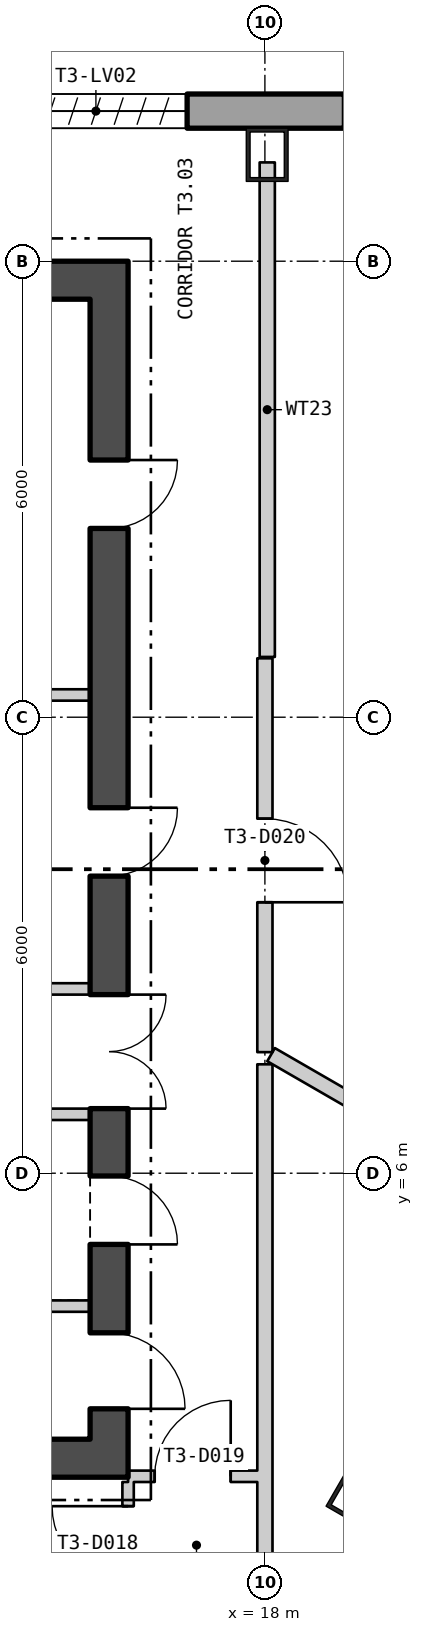
"""IFC4 building model, lengths in metres.
Left out: names, types, materials, properties, quantities, classifications, styles, units other than length and angle.
Written with IfcOpenShell. Run it as: python <this file> out.ifc"""

import sys

from ifc_helpers import new_model, si_unit, direction, frame, frame_2d, origin, origin_2d, place, context, subcontext, project, spatial, polyline, rectangle, hollow_rectangle, outline, extrude, element, fill, save


model = new_model("IFC4")
c1 = context("Model", 3, precision=1e-05, world=origin(), true_north=direction((0.0, 1.0)))
c2 = subcontext(c1, "Body", "Model", "MODEL_VIEW")
j1 = project(units=[si_unit("LENGTHUNIT", "METRE"), si_unit("PLANEANGLEUNIT", "RADIAN")], contexts=[c1])
p1 = place(None, origin())
s1 = spatial("IfcSite", under=j1, at=p1, CompositionType="ELEMENT")
p2 = place(p1, origin())
s2 = spatial("IfcBuilding", under=s1, at=p2, CompositionType="ELEMENT")
p3 = place(p2, frame((0.0, 0.0, 186.6)))
s3 = spatial("IfcBuildingStorey", under=s2, at=p3, CompositionType="ELEMENT", Elevation=186.6)
for number, where, z_axis, x_axis in (
    (1, (18.03, 19.4, 0.0), (0.0, 0.0, 1.0), (-1.0, 0.0, 0.0)),
    (2, (19.245, 1.682, 0.0), (0.0, 0.0, 1.0), (0.5, 0.866, 0.0)),
):
    element("IfcColumn", number, at=place(p3, frame(where, z_axis=z_axis, x_axis=x_axis)), inside=s3, PredefinedType="COLUMN", context=c2, shape_type="SweptSolid", body=[
        extrude(hollow_rectangle(XDim=0.55, YDim=0.7, WallThickness=0.05, at=origin_2d()), origin(), (0.0, 0.0, 1.0), 6.0),
    ])
p4 = place(p3, frame((22.87, 19.975, -0.4), z_axis=(0.0, 0.0, 1.0), x_axis=(-1.0, 0.0, 0.0)))
e3 = element("IfcWall", 3, at=p4, inside=s3, PredefinedType="SOLIDWALL", context=c2, shape_type="SweptSolid", body=[
    extrude(outline(polyline([(-0.13, -0.225), (45.87, -0.225), (45.61, 0.225), (0.13, 0.225), (-0.13, -0.225)])), origin(), (0.0, 0.0, 1.0), 6.0),
])
p5 = place(p4, frame((1.424, 0.0, 1.6)))
e4 = element("IfcOpeningElement", 4, at=p5, cuts=e3, PredefinedType="OPENING", context=c2, shape_type="SweptSolid", body=[
    extrude(rectangle(XDim=2.4, YDim=3.6, at=frame_2d((1.2, 1.8))), frame((0.0, 0.235, 0.0), z_axis=(0.0, -1.0, 0.0), x_axis=(1.0, 0.0, 0.0)), (0.0, 0.0, 1.0), 0.47),
])
p6 = place(p4, frame((5.893, 0.0, 1.6)))
e5 = element("IfcOpeningElement", 5, at=p6, cuts=e3, PredefinedType="OPENING", context=c2, shape_type="SweptSolid", body=[
    extrude(rectangle(XDim=2.4, YDim=3.6, at=frame_2d((1.2, 1.8))), frame((0.0, 0.235, 0.0), z_axis=(0.0, -1.0, 0.0), x_axis=(1.0, 0.0, 0.0)), (0.0, 0.0, 1.0), 0.47),
])
p7 = place(p4, frame((10.401, 0.0, 1.6)))
e6 = element("IfcOpeningElement", 6, at=p7, cuts=e3, PredefinedType="OPENING", context=c2, shape_type="SweptSolid", body=[
    extrude(rectangle(XDim=2.4, YDim=3.6, at=frame_2d((1.2, 1.8))), frame((0.0, 0.235, 0.0), z_axis=(0.0, -1.0, 0.0), x_axis=(1.0, 0.0, 0.0)), (0.0, 0.0, 1.0), 0.47),
])
p8 = place(p4, frame((14.909, 0.0, 1.6)))
e7 = element("IfcOpeningElement", 7, at=p8, cuts=e3, PredefinedType="OPENING", context=c2, shape_type="SweptSolid", body=[
    extrude(rectangle(XDim=2.4, YDim=3.6, at=frame_2d((1.2, 1.8))), frame((0.0, 0.235, 0.0), z_axis=(0.0, -1.0, 0.0), x_axis=(1.0, 0.0, 0.0)), (0.0, 0.0, 1.0), 0.47),
])
p9 = place(p4, frame((19.416, 0.0, 1.6)))
e8 = element("IfcOpeningElement", 8, at=p9, cuts=e3, PredefinedType="OPENING", context=c2, shape_type="SweptSolid", body=[
    extrude(rectangle(XDim=2.4, YDim=3.6, at=frame_2d((1.2, 1.8))), frame((0.0, 0.235, 0.0), z_axis=(0.0, -1.0, 0.0), x_axis=(1.0, 0.0, 0.0)), (0.0, 0.0, 1.0), 0.47),
])
p10 = place(p4, frame((23.924, 0.0, 1.6)))
e9 = element("IfcOpeningElement", 9, at=p10, cuts=e3, PredefinedType="OPENING", context=c2, shape_type="SweptSolid", body=[
    extrude(rectangle(XDim=2.4, YDim=3.6, at=frame_2d((1.2, 1.8))), frame((0.0, 0.235, 0.0), z_axis=(0.0, -1.0, 0.0), x_axis=(1.0, 0.0, 0.0)), (0.0, 0.0, 1.0), 0.47),
])
p11 = place(p4, frame((28.431, 0.0, 1.6)))
e10 = element("IfcOpeningElement", 10, at=p11, cuts=e3, PredefinedType="OPENING", context=c2, shape_type="SweptSolid", body=[
    extrude(rectangle(XDim=2.4, YDim=3.6, at=frame_2d((1.2, 1.8))), frame((0.0, 0.235, 0.0), z_axis=(0.0, -1.0, 0.0), x_axis=(1.0, 0.0, 0.0)), (0.0, 0.0, 1.0), 0.47),
])
p12 = place(p4, frame((32.939, 0.0, 1.6)))
e11 = element("IfcOpeningElement", 11, at=p12, cuts=e3, PredefinedType="OPENING", context=c2, shape_type="SweptSolid", body=[
    extrude(rectangle(XDim=2.4, YDim=3.6, at=frame_2d((1.2, 1.8))), frame((0.0, 0.235, 0.0), z_axis=(0.0, -1.0, 0.0), x_axis=(1.0, 0.0, 0.0)), (0.0, 0.0, 1.0), 0.47),
])
p13 = place(p4, frame((37.447, 0.0, 1.6)))
e12 = element("IfcOpeningElement", 12, at=p13, cuts=e3, PredefinedType="OPENING", context=c2, shape_type="SweptSolid", body=[
    extrude(rectangle(XDim=2.4, YDim=3.6, at=frame_2d((1.2, 1.8))), frame((0.0, 0.235, 0.0), z_axis=(0.0, -1.0, 0.0), x_axis=(1.0, 0.0, 0.0)), (0.0, 0.0, 1.0), 0.47),
])
p14 = place(p4, frame((41.916, 0.0, 1.6)))
e13 = element("IfcOpeningElement", 13, at=p14, cuts=e3, PredefinedType="OPENING", context=c2, shape_type="SweptSolid", body=[
    extrude(rectangle(XDim=2.4, YDim=3.6, at=frame_2d((1.2, 1.8))), frame((0.0, 0.235, 0.0), z_axis=(0.0, -1.0, 0.0), x_axis=(1.0, 0.0, 0.0)), (0.0, 0.0, 1.0), 0.47),
])
p15 = place(p3, frame((3.8, -26.219, -0.18), z_axis=(0.0, 0.0, 1.0), x_axis=(0.500000711659, 0.866024992908, 0.0)))
e14 = element("IfcWall", 14, at=p15, inside=s3, PredefinedType="SOLIDWALL", context=c2, shape_type="SweptSolid", body=[
    extrude(outline(polyline([(-0.13, -0.225), (45.87, -0.225), (45.61, 0.225), (0.13, 0.225), (-0.13, -0.225)])), origin(), (0.0, 0.0, 1.0), 6.0),
])
p16 = place(p15, frame((1.424, 0.0, 1.38)))
e15 = element("IfcOpeningElement", 15, at=p16, cuts=e14, PredefinedType="OPENING", context=c2, shape_type="SweptSolid", body=[
    extrude(rectangle(XDim=2.4, YDim=3.6, at=frame_2d((1.2, 1.8))), frame((0.0, 0.235, 0.0), z_axis=(0.0, -1.0, 0.0), x_axis=(1.0, 0.0, 0.0)), (0.0, 0.0, 1.0), 0.47),
])
p17 = place(p15, frame((5.893, 0.0, 1.38)))
e16 = element("IfcOpeningElement", 16, at=p17, cuts=e14, PredefinedType="OPENING", context=c2, shape_type="SweptSolid", body=[
    extrude(rectangle(XDim=2.4, YDim=3.6, at=frame_2d((1.2, 1.8))), frame((0.0, 0.235, 0.0), z_axis=(0.0, -1.0, 0.0), x_axis=(1.0, 0.0, 0.0)), (0.0, 0.0, 1.0), 0.47),
])
p18 = place(p15, frame((10.401, 0.0, 1.38)))
e17 = element("IfcOpeningElement", 17, at=p18, cuts=e14, PredefinedType="OPENING", context=c2, shape_type="SweptSolid", body=[
    extrude(rectangle(XDim=2.4, YDim=3.6, at=frame_2d((1.2, 1.8))), frame((0.0, 0.235, 0.0), z_axis=(0.0, -1.0, 0.0), x_axis=(1.0, 0.0, 0.0)), (0.0, 0.0, 1.0), 0.47),
])
p19 = place(p15, frame((14.909, 0.0, 1.38)))
e18 = element("IfcOpeningElement", 18, at=p19, cuts=e14, PredefinedType="OPENING", context=c2, shape_type="SweptSolid", body=[
    extrude(rectangle(XDim=2.4, YDim=3.6, at=frame_2d((1.2, 1.8))), frame((0.0, 0.235, 0.0), z_axis=(0.0, -1.0, 0.0), x_axis=(1.0, 0.0, 0.0)), (0.0, 0.0, 1.0), 0.47),
])
p20 = place(p15, frame((19.416, 0.0, 1.38)))
e19 = element("IfcOpeningElement", 19, at=p20, cuts=e14, PredefinedType="OPENING", context=c2, shape_type="SweptSolid", body=[
    extrude(rectangle(XDim=2.4, YDim=3.6, at=frame_2d((1.2, 1.8))), frame((0.0, 0.235, 0.0), z_axis=(0.0, -1.0, 0.0), x_axis=(1.0, 0.0, 0.0)), (0.0, 0.0, 1.0), 0.47),
])
p21 = place(p15, frame((23.924, 0.0, 1.38)))
e20 = element("IfcOpeningElement", 20, at=p21, cuts=e14, PredefinedType="OPENING", context=c2, shape_type="SweptSolid", body=[
    extrude(rectangle(XDim=2.4, YDim=3.6, at=frame_2d((1.2, 1.8))), frame((0.0, 0.235, 0.0), z_axis=(0.0, -1.0, 0.0), x_axis=(1.0, 0.0, 0.0)), (0.0, 0.0, 1.0), 0.47),
])
p22 = place(p15, frame((28.431, 0.0, 1.38)))
e21 = element("IfcOpeningElement", 21, at=p22, cuts=e14, PredefinedType="OPENING", context=c2, shape_type="SweptSolid", body=[
    extrude(rectangle(XDim=2.4, YDim=3.6, at=frame_2d((1.2, 1.8))), frame((0.0, 0.235, 0.0), z_axis=(0.0, -1.0, 0.0), x_axis=(1.0, 0.0, 0.0)), (0.0, 0.0, 1.0), 0.47),
])
p23 = place(p15, frame((32.939, 0.0, 1.38)))
e22 = element("IfcOpeningElement", 22, at=p23, cuts=e14, PredefinedType="OPENING", context=c2, shape_type="SweptSolid", body=[
    extrude(rectangle(XDim=2.4, YDim=3.6, at=frame_2d((1.2, 1.8))), frame((0.0, 0.235, 0.0), z_axis=(0.0, -1.0, 0.0), x_axis=(1.0, 0.0, 0.0)), (0.0, 0.0, 1.0), 0.47),
])
p24 = place(p15, frame((37.447, 0.0, 1.38)))
e23 = element("IfcOpeningElement", 23, at=p24, cuts=e14, PredefinedType="OPENING", context=c2, shape_type="SweptSolid", body=[
    extrude(rectangle(XDim=2.4, YDim=3.6, at=frame_2d((1.2, 1.8))), frame((0.0, 0.235, 0.0), z_axis=(0.0, -1.0, 0.0), x_axis=(1.0, 0.0, 0.0)), (0.0, 0.0, 1.0), 0.47),
])
p25 = place(p15, frame((41.916, 0.0, 1.38)))
e24 = element("IfcOpeningElement", 24, at=p25, cuts=e14, PredefinedType="OPENING", context=c2, shape_type="SweptSolid", body=[
    extrude(rectangle(XDim=2.4, YDim=3.6, at=frame_2d((1.2, 1.8))), frame((0.0, 0.235, 0.0), z_axis=(0.0, -1.0, 0.0), x_axis=(1.0, 0.0, 0.0)), (0.0, 0.0, 1.0), 0.47),
])
p26 = place(p3, frame((-16.2, 2.25, 0.0), z_axis=(0.0, 0.0, 1.0), x_axis=(1.0, 0.0, 0.0)))
e25 = element("IfcWall", 25, at=p26, inside=s3, PredefinedType="SHEAR", context=c2, shape_type="SweptSolid", body=[
    extrude(rectangle(XDim=32.4, YDim=0.5, at=frame_2d((16.2, 0.0))), origin(), (0.0, 0.0, 1.0), 5.8),
])
p27 = place(p26, frame((10.7, 0.0, 0.0)))
e26 = element("IfcOpeningElement", 26, at=p27, cuts=e25, PredefinedType="OPENING", context=c2, shape_type="SweptSolid", body=[
    extrude(rectangle(XDim=1.8, YDim=2.4, at=frame_2d((0.9, 1.2))), frame((0.0, 0.26, 0.0), z_axis=(0.0, -1.0, 0.0), x_axis=(1.0, 0.0, 0.0)), (0.0, 0.0, 1.0), 0.52),
])
p28 = place(p26, frame((20.7, 0.0, 0.0)))
e27 = element("IfcOpeningElement", 27, at=p28, cuts=e25, PredefinedType="OPENING", context=c2, shape_type="SweptSolid", body=[
    extrude(rectangle(XDim=1.8, YDim=2.4, at=frame_2d((0.9, 1.2))), frame((0.0, 0.26, 0.0), z_axis=(0.0, -1.0, 0.0), x_axis=(1.0, 0.0, 0.0)), (0.0, 0.0, 1.0), 0.52),
])
p29 = place(p3, frame((-16.2, 17.75, 0.0), z_axis=(0.0, 0.0, 1.0), x_axis=(1.0, 0.0, 0.0)))
e28 = element("IfcWall", 28, at=p29, inside=s3, PredefinedType="SHEAR", context=c2, shape_type="SweptSolid", body=[
    extrude(rectangle(XDim=32.4, YDim=0.5, at=frame_2d((16.2, 0.0))), origin(), (0.0, 0.0, 1.0), 5.8),
])
p30 = place(p3, frame((15.95, 2.5, 0.0), z_axis=(0.0, 0.0, 1.0), x_axis=(0.0, 1.0, 0.0)))
e29 = element("IfcWall", 29, at=p30, inside=s3, PredefinedType="SHEAR", context=c2, shape_type="SweptSolid", body=[
    extrude(rectangle(XDim=15.0, YDim=0.5, at=frame_2d((7.5, 0.0))), origin(), (0.0, 0.0, 1.0), 5.8),
])
p31 = place(p30, frame((4.35, 0.0, 0.0)))
e30 = element("IfcOpeningElement", 30, at=p31, cuts=e29, PredefinedType="OPENING", context=c2, shape_type="SweptSolid", body=[
    extrude(rectangle(XDim=1.5, YDim=2.1, at=frame_2d((0.75, 1.05))), frame((0.0, 0.26, 0.0), z_axis=(0.0, -1.0, 0.0), x_axis=(1.0, 0.0, 0.0)), (0.0, 0.0, 1.0), 0.52),
])
p32 = place(p30, frame((0.4, 0.0, 0.0)))
e31 = element("IfcOpeningElement", 31, at=p32, cuts=e29, PredefinedType="OPENING", context=c2, shape_type="SweptSolid", body=[
    extrude(rectangle(XDim=1.0, YDim=2.1, at=frame_2d((0.5, 1.05))), frame((0.0, 0.26, 0.0), z_axis=(0.0, -1.0, 0.0), x_axis=(1.0, 0.0, 0.0)), (0.0, 0.0, 1.0), 0.52),
])
p33 = place(p30, frame((2.563, 0.0, 0.0)))
e32 = element("IfcOpeningElement", 32, at=p33, cuts=e29, PredefinedType="OPENING", context=c2, shape_type="SweptSolid", body=[
    extrude(rectangle(XDim=0.9, YDim=2.1, at=frame_2d((0.45, 1.05))), frame((0.0, 0.26, 0.0), z_axis=(0.0, -1.0, 0.0), x_axis=(1.0, 0.0, 0.0)), (0.0, 0.0, 1.0), 0.52),
])
p34 = place(p30, frame((7.409, 0.0, 0.0)))
e33 = element("IfcOpeningElement", 33, at=p34, cuts=e29, PredefinedType="OPENING", context=c2, shape_type="SweptSolid", body=[
    extrude(rectangle(XDim=0.9, YDim=2.1, at=frame_2d((0.45, 1.05))), frame((0.0, 0.26, 0.0), z_axis=(0.0, -1.0, 0.0), x_axis=(1.0, 0.0, 0.0)), (0.0, 0.0, 1.0), 0.52),
])
p35 = place(p30, frame((11.984, 0.0, 0.0)))
e34 = element("IfcOpeningElement", 34, at=p35, cuts=e29, PredefinedType="OPENING", context=c2, shape_type="SweptSolid", body=[
    extrude(rectangle(XDim=0.9, YDim=2.1, at=frame_2d((0.45, 1.05))), frame((0.0, 0.26, 0.0), z_axis=(0.0, -1.0, 0.0), x_axis=(1.0, 0.0, 0.0)), (0.0, 0.0, 1.0), 0.52),
])
for number, where, z_axis, x_axis in (
    (35, (14.5, 6.775, 0.0), (0.0, 0.0, 1.0), (1.0, 0.0, 0.0)),
    (36, (14.5, 8.425, 0.0), (0.0, 0.0, 1.0), (1.0, 0.0, 0.0)),
    (37, (14.5, 4.251, 0.0), (0.0, 0.0, 1.0), (1.0, 0.0, 0.0)),
    (38, (14.5, 12.293, 0.0), (0.0, 0.0, 1.0), (1.0, 0.0, 0.0)),
):
    element("IfcWall", number, at=place(p3, frame(where, z_axis=z_axis, x_axis=x_axis)), inside=s3, PredefinedType="PARTITIONING", context=c2, shape_type="SweptSolid", body=[
        extrude(rectangle(XDim=1.2, YDim=0.15, at=frame_2d((0.6, 0.0))), origin(), (0.0, 0.0, 1.0), 5.8),
    ])
p36 = place(p3, frame((16.2, 0.3, 0.0), z_axis=(0.0, 0.0, 1.0), x_axis=(0.0, 1.0, 0.0)))
e39 = element("IfcWall", 39, at=p36, inside=s3, PredefinedType="PARTITIONING", context=c2, shape_type="SweptSolid", body=[
    extrude(rectangle(XDim=1.637, YDim=0.15, at=frame_2d((0.819, 0.0))), origin(), (0.0, 0.0, 1.0), 5.8),
])
p37 = place(p36, frame((0.319, 0.0, 0.0)))
e40 = element("IfcOpeningElement", 40, at=p37, cuts=e39, PredefinedType="OPENING", context=c2, shape_type="SweptSolid", body=[
    extrude(rectangle(XDim=1.0, YDim=2.1, at=frame_2d((0.5, 1.05))), frame((0.0, 0.085, 0.0), z_axis=(0.0, -1.0, 0.0), x_axis=(1.0, 0.0, 0.0)), (0.0, 0.0, 1.0), 0.17),
])
p38 = place(p3, frame((16.2, 2.012, 0.0), z_axis=(0.0, 0.0, 1.0), x_axis=(1.0, 0.0, 0.0)))
e41 = element("IfcWall", 41, at=p38, inside=s3, PredefinedType="PARTITIONING", context=c2, shape_type="SweptSolid", body=[
    extrude(rectangle(XDim=1.7, YDim=0.15, at=frame_2d((0.85, 0.0))), origin(), (0.0, 0.0, 1.0), 5.21),
])
p39 = place(p38, frame((0.35, 0.0, 0.0)))
e42 = element("IfcOpeningElement", 42, at=p39, cuts=e41, PredefinedType="OPENING", context=c2, shape_type="SweptSolid", body=[
    extrude(rectangle(XDim=1.0, YDim=2.1, at=frame_2d((0.5, 1.05))), frame((0.0, 0.085, 0.0), z_axis=(0.0, -1.0, 0.0), x_axis=(1.0, 0.0, 0.0)), (0.0, 0.0, 1.0), 0.17),
])
p40 = place(p3, frame((18.0, 0.3, 0.0), z_axis=(0.0, 0.0, 1.0), x_axis=(0.0, 1.0, 0.0)))
e43 = element("IfcWall", 43, at=p40, inside=s3, PredefinedType="PARTITIONING", context=c2, shape_type="SweptSolid", body=[
    extrude(rectangle(XDim=7.133, YDim=0.2, at=frame_2d((3.567, 0.0))), origin(), (0.0, 0.0, 1.0), 5.8),
])
p41 = place(p3, frame((18.0, 7.593, 0.0), z_axis=(0.0, 0.0, 1.0), x_axis=(0.0, 1.0, 0.0)))
e44 = element("IfcWall", 44, at=p41, inside=s3, PredefinedType="PARTITIONING", context=c2, shape_type="SweptSolid", body=[
    extrude(rectangle(XDim=5.182, YDim=0.2, at=frame_2d((2.591, 0.0))), origin(), (0.0, 0.0, 1.0), 5.8),
])
p42 = place(p41, frame((1.972, 0.0, 0.0)))
e45 = element("IfcOpeningElement", 45, at=p42, cuts=e44, PredefinedType="OPENING", context=c2, shape_type="SweptSolid", body=[
    extrude(rectangle(XDim=1.1, YDim=2.1, at=frame_2d((0.55, 1.05))), frame((0.0, 0.11, 0.0), z_axis=(0.0, -1.0, 0.0), x_axis=(1.0, 0.0, 0.0)), (0.0, 0.0, 1.0), 0.22),
])
p43 = place(p3, frame((18.031, 12.793, 0.0), z_axis=(0.0, 0.0, 1.0), x_axis=(0.0, 1.0, 0.0)))
e46 = element("IfcWall", 46, at=p43, inside=s3, PredefinedType="PARTITIONING", context=c2, shape_type="SweptSolid", body=[
    extrude(rectangle(XDim=6.507, YDim=0.2, at=frame_2d((3.253, 0.0))), origin(), (0.0, 0.0, 1.0), 5.8),
])
p44 = place(p3, frame((18.081, 7.56, 0.0), z_axis=(0.0, 0.0, 1.0), x_axis=(0.86593012836, -0.500164985579, 0.0)))
e47 = element("IfcWall", 47, at=p44, inside=s3, PredefinedType="PARTITIONING", context=c2, shape_type="SweptSolid", body=[
    extrude(rectangle(XDim=3.847, YDim=0.2, at=frame_2d((1.923, 0.0))), origin(), (0.0, 0.0, 1.0), 5.8),
])
p45 = place(p31, origin())
e48 = element("IfcDoor", 48, at=p45, inside=s3, OperationType="DOUBLE_DOOR_SINGLE_SWING", PredefinedType="DOOR", context=c2, shape_type="SweptSolid", body=[
    extrude(rectangle(XDim=1.5, YDim=2.1, at=frame_2d((0.75, 1.05))), frame((0.0, 0.025, 0.0), z_axis=(0.0, -1.0, 0.0), x_axis=(1.0, 0.0, 0.0)), (0.0, 0.0, 1.0), 0.05),
])
fill(e30, e48)
p46 = place(p32, origin())
e49 = element("IfcDoor", 49, at=p46, inside=s3, OperationType="SINGLE_SWING_LEFT", PredefinedType="DOOR", context=c2, shape_type="SweptSolid", body=[
    extrude(rectangle(XDim=1.0, YDim=2.1, at=frame_2d((0.5, 1.05))), frame((0.0, 0.025, 0.0), z_axis=(0.0, -1.0, 0.0), x_axis=(1.0, 0.0, 0.0)), (0.0, 0.0, 1.0), 0.05),
])
fill(e31, e49)
p47 = place(p33, origin())
e50 = element("IfcDoor", 50, at=p47, inside=s3, OperationType="SINGLE_SWING_LEFT", PredefinedType="DOOR", context=c2, shape_type="SweptSolid", body=[
    extrude(rectangle(XDim=0.9, YDim=2.1, at=frame_2d((0.45, 1.05))), frame((0.0, 0.025, 0.0), z_axis=(0.0, -1.0, 0.0), x_axis=(1.0, 0.0, 0.0)), (0.0, 0.0, 1.0), 0.05),
])
fill(e32, e50)
p48 = place(p34, origin())
e51 = element("IfcDoor", 51, at=p48, inside=s3, OperationType="SINGLE_SWING_RIGHT", PredefinedType="DOOR", context=c2, shape_type="SweptSolid", body=[
    extrude(rectangle(XDim=0.9, YDim=2.1, at=frame_2d((0.45, 1.05))), frame((0.0, 0.025, 0.0), z_axis=(0.0, -1.0, 0.0), x_axis=(1.0, 0.0, 0.0)), (0.0, 0.0, 1.0), 0.05),
])
fill(e33, e51)
p49 = place(p35, origin())
e52 = element("IfcDoor", 52, at=p49, inside=s3, OperationType="SINGLE_SWING_RIGHT", PredefinedType="DOOR", context=c2, shape_type="SweptSolid", body=[
    extrude(rectangle(XDim=0.9, YDim=2.1, at=frame_2d((0.45, 1.05))), frame((0.0, 0.025, 0.0), z_axis=(0.0, -1.0, 0.0), x_axis=(1.0, 0.0, 0.0)), (0.0, 0.0, 1.0), 0.05),
])
fill(e34, e52)
p50 = place(p37, origin())
e53 = element("IfcDoor", 53, at=p50, inside=s3, OperationType="SINGLE_SWING_LEFT", PredefinedType="DOOR", context=c2, shape_type="SweptSolid", body=[
    extrude(rectangle(XDim=1.0, YDim=2.1, at=frame_2d((0.5, 1.05))), frame((0.0, 0.025, 0.0), z_axis=(0.0, -1.0, 0.0), x_axis=(1.0, 0.0, 0.0)), (0.0, 0.0, 1.0), 0.05),
])
fill(e40, e53)
p51 = place(p39, origin())
e54 = element("IfcDoor", 54, at=p51, inside=s3, OperationType="SINGLE_SWING_LEFT", PredefinedType="DOOR", context=c2, shape_type="SweptSolid", body=[
    extrude(rectangle(XDim=1.0, YDim=2.1, at=frame_2d((0.5, 1.05))), frame((0.0, 0.025, 0.0), z_axis=(0.0, -1.0, 0.0), x_axis=(1.0, 0.0, 0.0)), (0.0, 0.0, 1.0), 0.05),
])
fill(e42, e54)
p52 = place(p42, origin())
e55 = element("IfcDoor", 55, at=p52, inside=s3, OperationType="SINGLE_SWING_LEFT", PredefinedType="DOOR", context=c2, shape_type="SweptSolid", body=[
    extrude(rectangle(XDim=1.1, YDim=2.1, at=frame_2d((0.55, 1.05))), frame((0.0, 0.025, 0.0), z_axis=(0.0, -1.0, 0.0), x_axis=(1.0, 0.0, 0.0)), (0.0, 0.0, 1.0), 0.05),
])
fill(e45, e55)
save(model, sys.argv[1])
